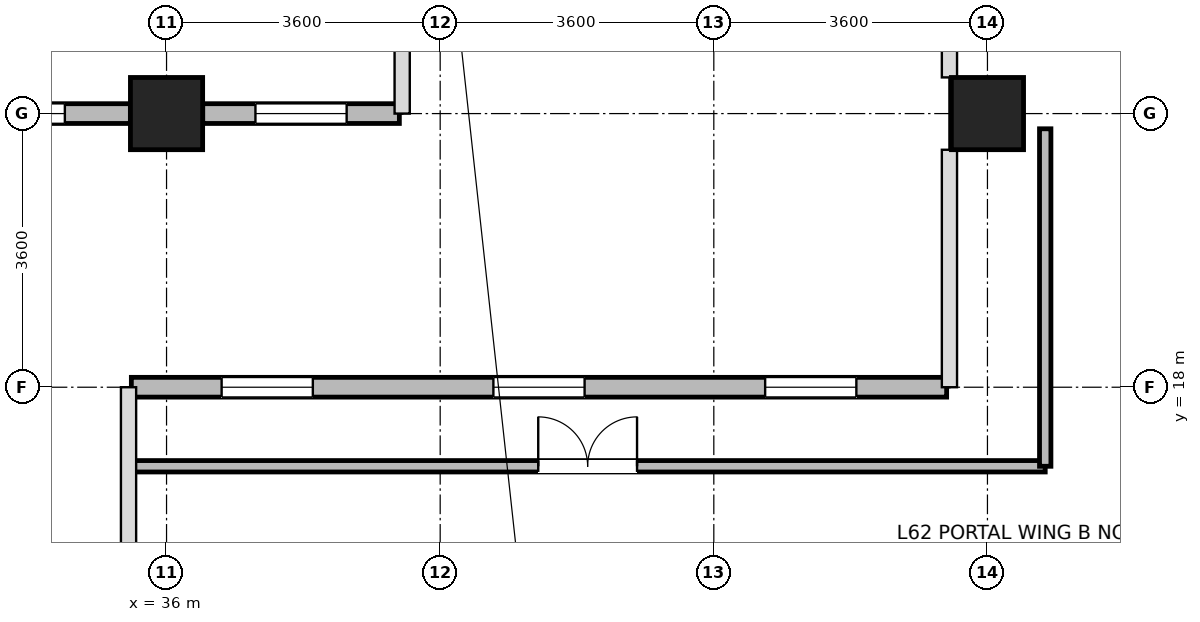
"""IFC4 building model, lengths in metres.
Left out: names, types, materials, properties, quantities, classifications, styles, units other than length and angle.
Written with IfcOpenShell. Run it as: python <this file> out.ifc"""

import sys

from ifc_helpers import new_model, si_unit, direction, frame, frame_2d, origin, origin_2d, place, context, subcontext, project, spatial, rectangle, extrude, source, transform, mapped, element, fill, save


model = new_model("IFC4")
c1 = context("Model", 3, precision=1e-05, world=origin(), true_north=direction((0.0, 1.0)))
c2 = subcontext(c1, "Body", "Model", "MODEL_VIEW")
j1 = project(units=[si_unit("LENGTHUNIT", "METRE"), si_unit("PLANEANGLEUNIT", "RADIAN")], contexts=[c1])
p1 = place(None, origin())
s1 = spatial("IfcSite", under=j1, at=p1, CompositionType="ELEMENT")
p2 = place(p1, origin())
s2 = spatial("IfcBuilding", under=s1, at=p2, CompositionType="ELEMENT")
p3 = place(p2, frame((0.0, 0.0, 242.5)))
s3 = spatial("IfcBuildingStorey", under=s2, at=p3, CompositionType="ELEMENT", Elevation=242.5)
m1 = source(origin(), c2, "Body", "SweptSolid", [
    extrude(rectangle(XDim=0.95, YDim=0.95, at=origin_2d()), origin(), (0.0, 0.0, 1.0), 3.7),
])
for number, where, z_axis, x_axis in (
    (1, (36.0, 21.6, 0.0), (0.0, 0.0, 1.0), (1.0, 0.0, 0.0)),
    (2, (46.8, 21.6, 0.0), (0.0, 0.0, 1.0), (1.0, 0.0, 0.0)),
):
    element("IfcColumn", number, at=place(p3, frame(where, z_axis=z_axis, x_axis=x_axis)), inside=s3, PredefinedType="COLUMN", context=c2, shape_type="MappedRepresentation", body=[
        mapped(m1, transform((0.0, 0.0, 0.0), x_axis=(1.0, 0.0, 0.0), y_axis=(0.0, 1.0, 0.0), z_axis=(0.0, 0.0, 1.0), scale=1.0)),
    ])
p4 = place(p3, frame((35.524, 21.6, 0.0), z_axis=(0.0, 0.0, 1.0), x_axis=(-1.0, 0.0, 0.0)))
e3 = element("IfcWall", 3, at=p4, inside=s3, PredefinedType="STANDARD", context=c2, shape_type="SweptSolid", body=[
    extrude(rectangle(XDim=2.923, YDim=0.26, at=frame_2d((1.462, 0.0))), origin(), (0.0, 0.0, 1.0), 3.02),
])
p5 = place(p4, frame((0.862, 0.0, 0.85)))
e4 = element("IfcOpeningElement", 4, at=p5, cuts=e3, PredefinedType="OPENING", context=c2, shape_type="SweptSolid", body=[
    extrude(rectangle(XDim=1.2, YDim=1.75, at=frame_2d((0.6, 0.875))), frame((0.0, 0.14, 0.0), z_axis=(0.0, -1.0, 0.0), x_axis=(1.0, 0.0, 0.0)), (0.0, 0.0, 1.0), 0.28),
])
p6 = place(p3, frame((39.063, 21.6, 0.0), z_axis=(0.0, 0.0, 1.0), x_axis=(-1.0, 0.0, 0.0)))
e5 = element("IfcWall", 5, at=p6, inside=s3, PredefinedType="STANDARD", context=c2, shape_type="SweptSolid", body=[
    extrude(rectangle(XDim=2.587, YDim=0.26, at=frame_2d((1.293, 0.0))), origin(), (0.0, 0.0, 1.0), 3.42),
])
p7 = place(p6, frame((0.694, 0.0, 0.85)))
e6 = element("IfcOpeningElement", 6, at=p7, cuts=e5, PredefinedType="OPENING", context=c2, shape_type="SweptSolid", body=[
    extrude(rectangle(XDim=1.2, YDim=1.75, at=frame_2d((0.6, 0.875))), frame((0.0, 0.14, 0.0), z_axis=(0.0, -1.0, 0.0), x_axis=(1.0, 0.0, 0.0)), (0.0, 0.0, 1.0), 0.28),
])
p8 = place(p3, frame((35.537, 18.0, 0.0), z_axis=(0.0, 0.0, 1.0), x_axis=(1.0, 0.0, 0.0)))
e7 = element("IfcWall", 7, at=p8, inside=s3, PredefinedType="STANDARD", context=c2, shape_type="SweptSolid", body=[
    extrude(rectangle(XDim=10.726, YDim=0.26, at=frame_2d((5.363, 0.0))), origin(), (0.0, 0.0, 1.0), 3.42),
])
p9 = place(p8, frame((1.188, 0.0, 0.85)))
e8 = element("IfcOpeningElement", 8, at=p9, cuts=e7, PredefinedType="OPENING", context=c2, shape_type="SweptSolid", body=[
    extrude(rectangle(XDim=1.2, YDim=1.75, at=frame_2d((0.6, 0.875))), frame((0.0, 0.14, 0.0), z_axis=(0.0, -1.0, 0.0), x_axis=(1.0, 0.0, 0.0)), (0.0, 0.0, 1.0), 0.28),
])
p10 = place(p8, frame((4.763, 0.0, 0.85)))
e9 = element("IfcOpeningElement", 9, at=p10, cuts=e7, PredefinedType="OPENING", context=c2, shape_type="SweptSolid", body=[
    extrude(rectangle(XDim=1.2, YDim=1.75, at=frame_2d((0.6, 0.875))), frame((0.0, 0.14, 0.0), z_axis=(0.0, -1.0, 0.0), x_axis=(1.0, 0.0, 0.0)), (0.0, 0.0, 1.0), 0.28),
])
p11 = place(p8, frame((8.338, 0.0, 0.85)))
e10 = element("IfcOpeningElement", 10, at=p11, cuts=e7, PredefinedType="OPENING", context=c2, shape_type="SweptSolid", body=[
    extrude(rectangle(XDim=1.2, YDim=1.75, at=frame_2d((0.6, 0.875))), frame((0.0, 0.14, 0.0), z_axis=(0.0, -1.0, 0.0), x_axis=(1.0, 0.0, 0.0)), (0.0, 0.0, 1.0), 0.28),
])
p12 = place(p3, frame((35.52, 16.96, 0.0), z_axis=(0.0, 0.0, 1.0), x_axis=(1.0, 0.0, 0.0)))
e11 = element("IfcWall", 11, at=p12, inside=s3, PredefinedType="PARTITIONING", context=c2, shape_type="SweptSolid", body=[
    extrude(rectangle(XDim=12.04, YDim=0.15, at=frame_2d((6.02, 0.0))), origin(), (0.0, 0.0, 1.0), 3.42),
])
p13 = place(p12, frame((5.37, 0.0, 0.0)))
e12 = element("IfcOpeningElement", 12, at=p13, cuts=e11, PredefinedType="OPENING", context=c2, shape_type="SweptSolid", body=[
    extrude(rectangle(XDim=1.3, YDim=2.12, at=frame_2d((0.65, 1.06))), frame((0.0, 0.085, 0.0), z_axis=(0.0, -1.0, 0.0), x_axis=(1.0, 0.0, 0.0)), (0.0, 0.0, 1.0), 0.17),
])
p14 = place(p3, frame((47.56, 16.96, 0.0), z_axis=(0.0, 0.0, 1.0), x_axis=(0.0, 1.0, 0.0)))
e13 = element("IfcWall", 13, at=p14, inside=s3, PredefinedType="PARTITIONING", context=c2, shape_type="SweptSolid", body=[
    extrude(rectangle(XDim=4.44, YDim=0.15, at=frame_2d((2.22, 0.0))), origin(), (0.0, 0.0, 1.0), 3.42),
])
p15 = place(p5, origin())
e14 = element("IfcWindow", 14, at=p15, inside=s3, PartitioningType="SINGLE_PANEL", PredefinedType="WINDOW", context=c2, shape_type="SweptSolid", body=[
    extrude(rectangle(XDim=1.2, YDim=1.75, at=frame_2d((0.6, 0.875))), frame((0.0, 0.03, 0.0), z_axis=(0.0, -1.0, 0.0), x_axis=(1.0, 0.0, 0.0)), (0.0, 0.0, 1.0), 0.06),
])
fill(e4, e14)
p16 = place(p7, origin())
e15 = element("IfcWindow", 15, at=p16, inside=s3, PartitioningType="SINGLE_PANEL", PredefinedType="WINDOW", context=c2, shape_type="SweptSolid", body=[
    extrude(rectangle(XDim=1.2, YDim=1.75, at=frame_2d((0.6, 0.875))), frame((0.0, 0.03, 0.0), z_axis=(0.0, -1.0, 0.0), x_axis=(1.0, 0.0, 0.0)), (0.0, 0.0, 1.0), 0.06),
])
fill(e6, e15)
p17 = place(p9, origin())
e16 = element("IfcWindow", 16, at=p17, inside=s3, PartitioningType="SINGLE_PANEL", PredefinedType="WINDOW", context=c2, shape_type="SweptSolid", body=[
    extrude(rectangle(XDim=1.2, YDim=1.75, at=frame_2d((0.6, 0.875))), frame((0.0, 0.03, 0.0), z_axis=(0.0, -1.0, 0.0), x_axis=(1.0, 0.0, 0.0)), (0.0, 0.0, 1.0), 0.06),
])
fill(e8, e16)
p18 = place(p10, origin())
e17 = element("IfcWindow", 17, at=p18, inside=s3, PartitioningType="SINGLE_PANEL", PredefinedType="WINDOW", context=c2, shape_type="SweptSolid", body=[
    extrude(rectangle(XDim=1.2, YDim=1.75, at=frame_2d((0.6, 0.875))), frame((0.0, 0.03, 0.0), z_axis=(0.0, -1.0, 0.0), x_axis=(1.0, 0.0, 0.0)), (0.0, 0.0, 1.0), 0.06),
])
fill(e9, e17)
p19 = place(p11, origin())
e18 = element("IfcWindow", 18, at=p19, inside=s3, PartitioningType="SINGLE_PANEL", PredefinedType="WINDOW", context=c2, shape_type="SweptSolid", body=[
    extrude(rectangle(XDim=1.2, YDim=1.75, at=frame_2d((0.6, 0.875))), frame((0.0, 0.03, 0.0), z_axis=(0.0, -1.0, 0.0), x_axis=(1.0, 0.0, 0.0)), (0.0, 0.0, 1.0), 0.06),
])
fill(e10, e18)
p20 = place(p13, origin())
e19 = element("IfcDoor", 19, at=p20, inside=s3, OperationType="DOUBLE_DOOR_SINGLE_SWING", PredefinedType="DOOR", context=c2, shape_type="SweptSolid", body=[
    extrude(rectangle(XDim=1.3, YDim=2.12, at=frame_2d((0.65, 1.06))), frame((0.0, 0.025, 0.0), z_axis=(0.0, -1.0, 0.0), x_axis=(1.0, 0.0, 0.0)), (0.0, 0.0, 1.0), 0.05),
])
fill(e12, e19)
save(model, sys.argv[1])
